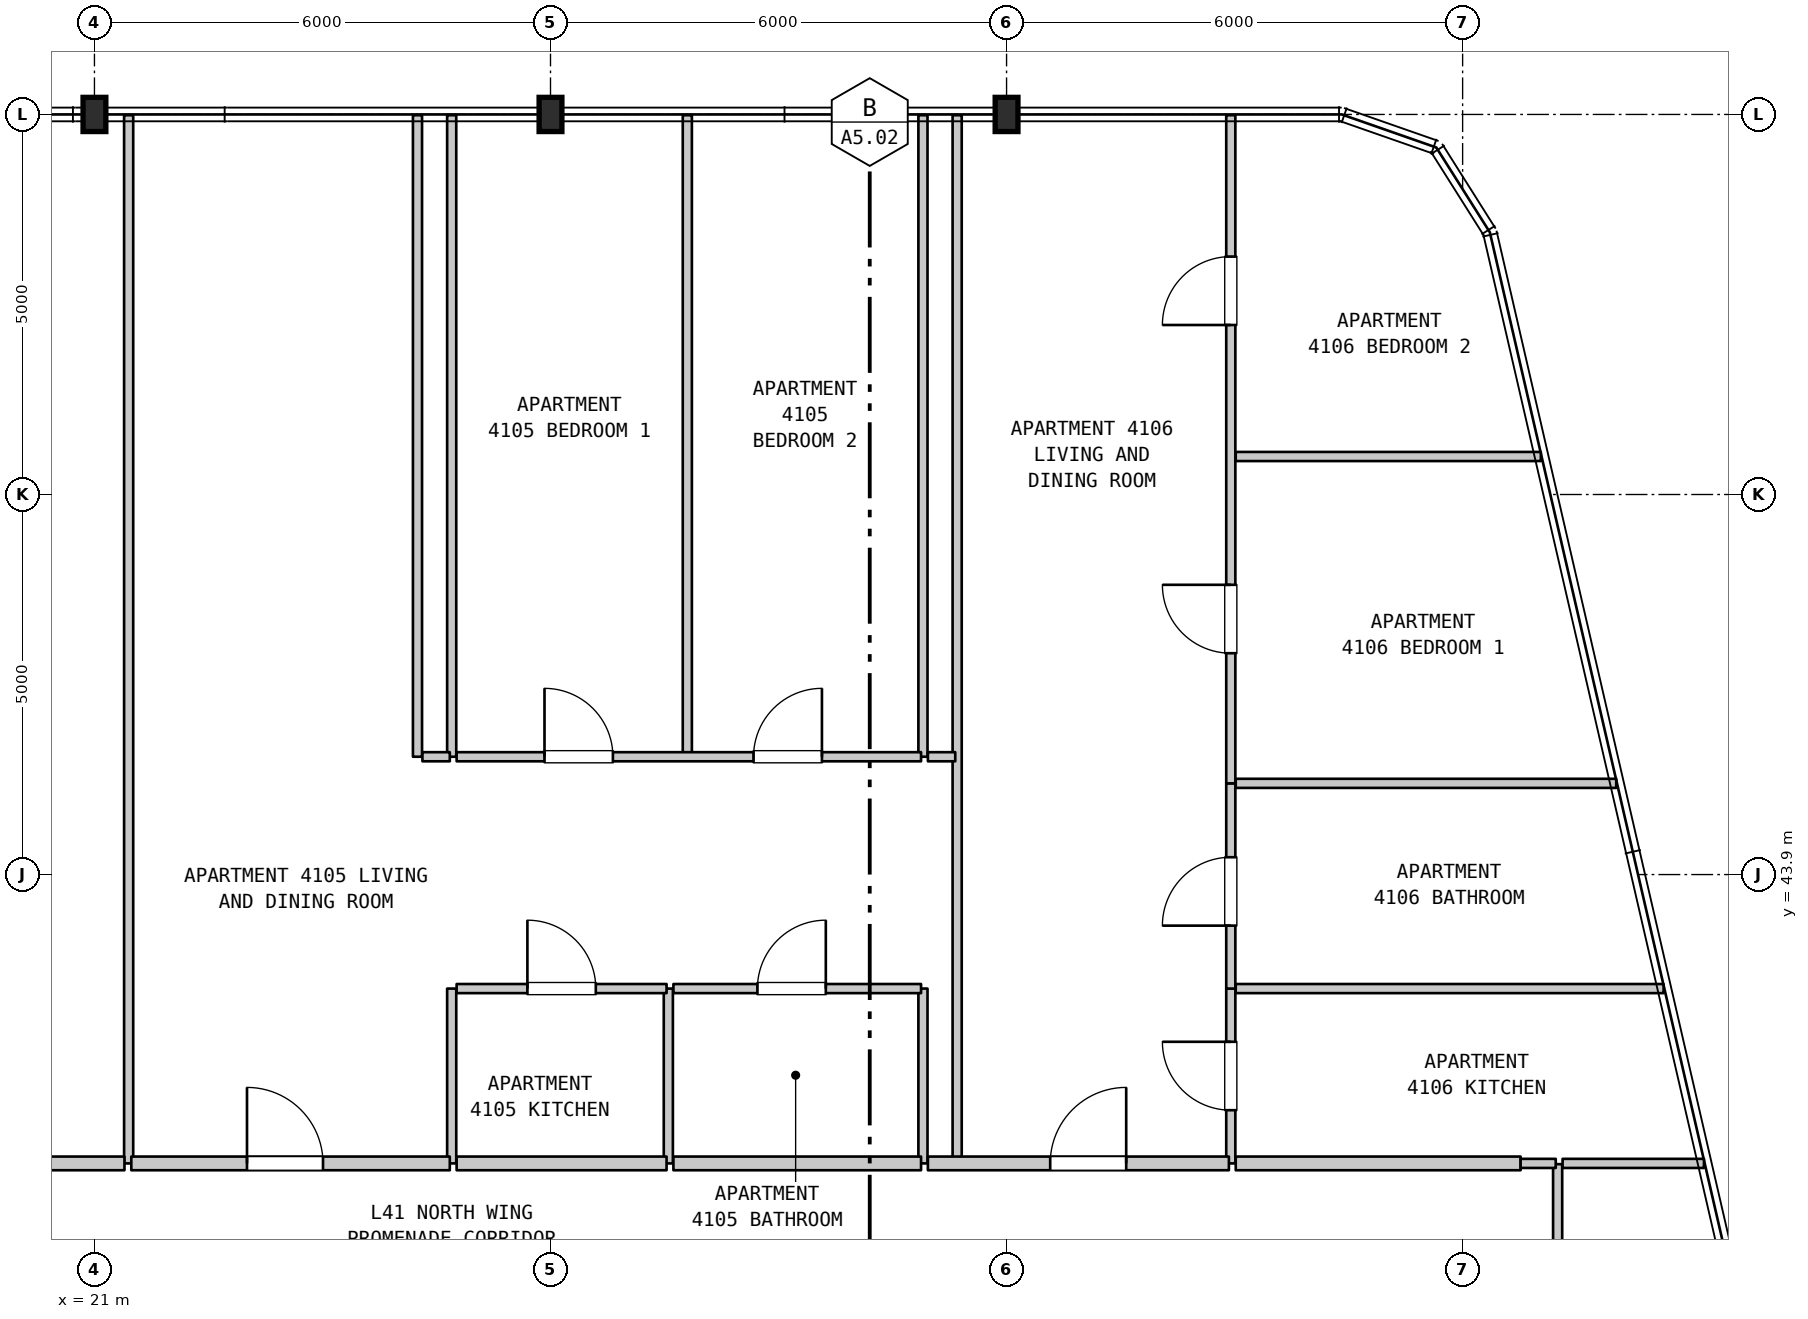
"""IFC4 building model, lengths in metres.
Left out: names, types, materials, properties, quantities, classifications, styles, units other than length and angle.
Written with IfcOpenShell. Run it as: python <this file> out.ifc"""

import sys

from ifc_helpers import new_model, si_unit, direction, frame, frame_2d, origin, origin_2d, place, context, subcontext, project, spatial, rectangle, i_section, extrude, element, fill, save


model = new_model("IFC4")
c1 = context("Model", 3, precision=1e-05, world=origin(), true_north=direction((0.0, 1.0)))
c2 = subcontext(c1, "Body", "Model", "MODEL_VIEW")
j1 = project(units=[si_unit("LENGTHUNIT", "METRE"), si_unit("PLANEANGLEUNIT", "RADIAN")], contexts=[c1])
p1 = place(None, origin())
s1 = spatial("IfcSite", under=j1, at=p1, CompositionType="ELEMENT")
p2 = place(p1, origin())
s2 = spatial("IfcBuilding", under=s1, at=p2, CompositionType="ELEMENT")
p3 = place(p2, frame((0.0, 0.0, 169.1)))
s3 = spatial("IfcBuildingStorey", under=s2, at=p3, CompositionType="ELEMENT", Elevation=169.1)
for number, where, z_axis, x_axis in (
    (1, (21.0, 53.9, 0.0), (0.0, 0.0, 1.0), (1.0, 0.0, 0.0)),
    (2, (27.0, 53.9, 0.0), (0.0, 0.0, 1.0), (1.0, 0.0, 0.0)),
    (3, (33.0, 53.9, 0.0), (0.0, 0.0, 1.0), (1.0, 0.0, 0.0)),
):
    element("IfcColumn", number, at=place(p3, frame(where, z_axis=z_axis, x_axis=x_axis)), inside=s3, PredefinedType="COLUMN", context=c2, shape_type="SweptSolid", body=[
        extrude(i_section(OverallWidth=0.3, OverallDepth=0.45, WebThickness=0.014, FlangeThickness=0.026, FilletRadius=0.027, at=origin_2d()), origin(), (0.0, 0.0, 1.0), 3.7),
    ])
p4 = place(p3, frame((21.45, 40.1, 0.0), z_axis=(0.0, 0.0, 1.0), x_axis=(0.0, 1.0, 0.0)))
e4 = element("IfcWall", 4, at=p4, inside=s3, PredefinedType="PARTITIONING", context=c2, shape_type="SweptSolid", body=[
    extrude(rectangle(XDim=13.79, YDim=0.12, at=frame_2d((6.895, 0.0))), origin(), (0.0, 0.0, 1.0), 3.39),
])
p5 = place(p3, frame((25.25, 45.45, 0.0), z_axis=(0.0, 0.0, 1.0), x_axis=(0.0, 1.0, 0.0)))
e5 = element("IfcWall", 5, at=p5, inside=s3, PredefinedType="PARTITIONING", context=c2, shape_type="SweptSolid", body=[
    extrude(rectangle(XDim=8.44, YDim=0.12, at=frame_2d((4.22, 0.0))), origin(), (0.0, 0.0, 1.0), 3.39),
])
p6 = place(p3, frame((25.7, 40.1, 0.0), z_axis=(0.0, 0.0, 1.0), x_axis=(0.0, 1.0, 0.0)))
e6 = element("IfcWall", 6, at=p6, inside=s3, PredefinedType="PARTITIONING", context=c2, shape_type="SweptSolid", body=[
    extrude(rectangle(XDim=2.3, YDim=0.12, at=frame_2d((1.15, 0.0))), origin(), (0.0, 0.0, 1.0), 3.39),
])
p7 = place(p3, frame((25.7, 45.45, 0.0), z_axis=(0.0, 0.0, 1.0), x_axis=(0.0, 1.0, 0.0)))
e7 = element("IfcWall", 7, at=p7, inside=s3, PredefinedType="PARTITIONING", context=c2, shape_type="SweptSolid", body=[
    extrude(rectangle(XDim=8.44, YDim=0.12, at=frame_2d((4.22, 0.0))), origin(), (0.0, 0.0, 1.0), 3.39),
])
p8 = place(p3, frame((28.55, 40.1, 0.0), z_axis=(0.0, 0.0, 1.0), x_axis=(0.0, 1.0, 0.0)))
e8 = element("IfcWall", 8, at=p8, inside=s3, PredefinedType="PARTITIONING", context=c2, shape_type="SweptSolid", body=[
    extrude(rectangle(XDim=2.3, YDim=0.12, at=frame_2d((1.15, 0.0))), origin(), (0.0, 0.0, 1.0), 3.39),
])
p9 = place(p3, frame((28.8, 45.45, 0.0), z_axis=(0.0, 0.0, 1.0), x_axis=(0.0, 1.0, 0.0)))
e9 = element("IfcWall", 9, at=p9, inside=s3, PredefinedType="PARTITIONING", context=c2, shape_type="SweptSolid", body=[
    extrude(rectangle(XDim=8.44, YDim=0.12, at=frame_2d((4.22, 0.0))), origin(), (0.0, 0.0, 1.0), 3.39),
])
p10 = place(p3, frame((31.9, 40.1, 0.0), z_axis=(0.0, 0.0, 1.0), x_axis=(0.0, 1.0, 0.0)))
e10 = element("IfcWall", 10, at=p10, inside=s3, PredefinedType="PARTITIONING", context=c2, shape_type="SweptSolid", body=[
    extrude(rectangle(XDim=2.3, YDim=0.12, at=frame_2d((1.15, 0.0))), origin(), (0.0, 0.0, 1.0), 3.39),
])
p11 = place(p3, frame((31.9, 45.45, 0.0), z_axis=(0.0, 0.0, 1.0), x_axis=(0.0, 1.0, 0.0)))
e11 = element("IfcWall", 11, at=p11, inside=s3, PredefinedType="PARTITIONING", context=c2, shape_type="SweptSolid", body=[
    extrude(rectangle(XDim=8.44, YDim=0.12, at=frame_2d((4.22, 0.0))), origin(), (0.0, 0.0, 1.0), 3.39),
])
p12 = place(p3, frame((32.35, 40.1, 0.0), z_axis=(0.0, 0.0, 1.0), x_axis=(0.0, 1.0, 0.0)))
e12 = element("IfcWall", 12, at=p12, inside=s3, PredefinedType="PARTITIONING", context=c2, shape_type="SweptSolid", body=[
    extrude(rectangle(XDim=13.79, YDim=0.12, at=frame_2d((6.895, 0.0))), origin(), (0.0, 0.0, 1.0), 3.39),
])
p13 = place(p3, frame((35.95, 40.1, 0.0), z_axis=(0.0, 0.0, 1.0), x_axis=(0.0, 1.0, 0.0)))
e13 = element("IfcWall", 13, at=p13, inside=s3, PredefinedType="PARTITIONING", context=c2, shape_type="SweptSolid", body=[
    extrude(rectangle(XDim=2.3, YDim=0.12, at=frame_2d((1.15, 0.0))), origin(), (0.0, 0.0, 1.0), 3.39),
])
p14 = place(p13, frame((0.7, 0.0, 0.0)))
e14 = element("IfcOpeningElement", 14, at=p14, cuts=e13, PredefinedType="OPENING", context=c2, shape_type="SweptSolid", body=[
    extrude(rectangle(XDim=0.9, YDim=2.15, at=frame_2d((0.45, 1.075))), frame((0.0, 0.07, 0.0), z_axis=(0.0, -1.0, 0.0), x_axis=(1.0, 0.0, 0.0)), (0.0, 0.0, 1.0), 0.14),
])
p15 = place(p3, frame((35.95, 42.4, 0.0), z_axis=(0.0, 0.0, 1.0), x_axis=(0.0, 1.0, 0.0)))
e15 = element("IfcWall", 15, at=p15, inside=s3, PredefinedType="PARTITIONING", context=c2, shape_type="SweptSolid", body=[
    extrude(rectangle(XDim=2.7, YDim=0.12, at=frame_2d((1.35, 0.0))), origin(), (0.0, 0.0, 1.0), 3.39),
])
p16 = place(p15, frame((0.828, 0.0, 0.0)))
e16 = element("IfcOpeningElement", 16, at=p16, cuts=e15, PredefinedType="OPENING", context=c2, shape_type="SweptSolid", body=[
    extrude(rectangle(XDim=0.9, YDim=2.1, at=frame_2d((0.45, 1.05))), frame((0.0, 0.07, 0.0), z_axis=(0.0, -1.0, 0.0), x_axis=(1.0, 0.0, 0.0)), (0.0, 0.0, 1.0), 0.14),
])
p17 = place(p3, frame((35.95, 45.1, 0.0), z_axis=(0.0, 0.0, 1.0), x_axis=(0.0, 1.0, 0.0)))
e17 = element("IfcWall", 17, at=p17, inside=s3, PredefinedType="PARTITIONING", context=c2, shape_type="SweptSolid", body=[
    extrude(rectangle(XDim=8.79, YDim=0.12, at=frame_2d((4.395, 0.0))), origin(), (0.0, 0.0, 1.0), 3.39),
])
p18 = place(p17, frame((1.712, 0.0, 0.0)))
e18 = element("IfcOpeningElement", 18, at=p18, cuts=e17, PredefinedType="OPENING", context=c2, shape_type="SweptSolid", body=[
    extrude(rectangle(XDim=0.9, YDim=2.15, at=frame_2d((0.45, 1.075))), frame((0.0, 0.07, 0.0), z_axis=(0.0, -1.0, 0.0), x_axis=(1.0, 0.0, 0.0)), (0.0, 0.0, 1.0), 0.14),
])
p19 = place(p17, frame((6.03, 0.0, 0.0)))
e19 = element("IfcOpeningElement", 19, at=p19, cuts=e17, PredefinedType="OPENING", context=c2, shape_type="SweptSolid", body=[
    extrude(rectangle(XDim=0.9, YDim=2.15, at=frame_2d((0.45, 1.075))), frame((0.0, 0.07, 0.0), z_axis=(0.0, -1.0, 0.0), x_axis=(1.0, 0.0, 0.0)), (0.0, 0.0, 1.0), 0.14),
])
p20 = place(p3, frame((40.25, 37.949, 0.0), z_axis=(0.0, 0.0, 1.0), x_axis=(0.0, 1.0, 0.0)))
e20 = element("IfcWall", 20, at=p20, inside=s3, PredefinedType="PARTITIONING", context=c2, shape_type="SweptSolid", body=[
    extrude(rectangle(XDim=2.141, YDim=0.12, at=frame_2d((1.071, 0.0))), origin(), (0.0, 0.0, 1.0), 3.39),
])
p21 = place(p3, frame((18.985, 40.1, 0.0), z_axis=(0.0, 0.0, 1.0), x_axis=(1.0, 0.0, 0.0)))
e21 = element("IfcWall", 21, at=p21, inside=s3, PredefinedType="STANDARD", context=c2, shape_type="SweptSolid", body=[
    extrude(rectangle(XDim=2.41, YDim=0.18, at=frame_2d((1.205, 0.0))), origin(), (0.0, 0.0, 1.0), 3.39),
])
p22 = place(p3, frame((21.485, 40.1, 0.0), z_axis=(0.0, 0.0, 1.0), x_axis=(1.0, 0.0, 0.0)))
e22 = element("IfcWall", 22, at=p22, inside=s3, PredefinedType="STANDARD", context=c2, shape_type="SweptSolid", body=[
    extrude(rectangle(XDim=4.19, YDim=0.18, at=frame_2d((2.095, 0.0))), origin(), (0.0, 0.0, 1.0), 3.39),
])
p23 = place(p22, frame((1.522, 0.0, 0.0)))
e23 = element("IfcOpeningElement", 23, at=p23, cuts=e22, PredefinedType="OPENING", context=c2, shape_type="SweptSolid", body=[
    extrude(rectangle(XDim=1.0, YDim=2.15, at=frame_2d((0.5, 1.075))), frame((0.0, 0.1, 0.0), z_axis=(0.0, -1.0, 0.0), x_axis=(1.0, 0.0, 0.0)), (0.0, 0.0, 1.0), 0.2),
])
p24 = place(p3, frame((25.765, 40.1, 0.0), z_axis=(0.0, 0.0, 1.0), x_axis=(1.0, 0.0, 0.0)))
e24 = element("IfcWall", 24, at=p24, inside=s3, PredefinedType="STANDARD", context=c2, shape_type="SweptSolid", body=[
    extrude(rectangle(XDim=2.762, YDim=0.18, at=frame_2d((1.381, 0.0))), origin(), (0.0, 0.0, 1.0), 3.39),
])
p25 = place(p3, frame((28.617, 40.1, 0.0), z_axis=(0.0, 0.0, 1.0), x_axis=(1.0, 0.0, 0.0)))
e25 = element("IfcWall", 25, at=p25, inside=s3, PredefinedType="STANDARD", context=c2, shape_type="SweptSolid", body=[
    extrude(rectangle(XDim=3.258, YDim=0.18, at=frame_2d((1.629, 0.0))), origin(), (0.0, 0.0, 1.0), 3.39),
])
p26 = place(p3, frame((31.965, 40.1, 0.0), z_axis=(0.0, 0.0, 1.0), x_axis=(1.0, 0.0, 0.0)))
e26 = element("IfcWall", 26, at=p26, inside=s3, PredefinedType="STANDARD", context=c2, shape_type="SweptSolid", body=[
    extrude(rectangle(XDim=3.96, YDim=0.18, at=frame_2d((1.98, 0.0))), origin(), (0.0, 0.0, 1.0), 3.39),
])
p27 = place(p26, frame((1.609, 0.0, 0.0)))
e27 = element("IfcOpeningElement", 27, at=p27, cuts=e26, PredefinedType="OPENING", context=c2, shape_type="SweptSolid", body=[
    extrude(rectangle(XDim=1.0, YDim=2.15, at=frame_2d((0.5, 1.075))), frame((0.0, 0.1, 0.0), z_axis=(0.0, -1.0, 0.0), x_axis=(1.0, 0.0, 0.0)), (0.0, 0.0, 1.0), 0.2),
])
p28 = place(p3, frame((36.015, 40.1, 0.0), z_axis=(0.0, 0.0, 1.0), x_axis=(1.0, 0.0, 0.0)))
e28 = element("IfcWall", 28, at=p28, inside=s3, PredefinedType="STANDARD", context=c2, shape_type="SweptSolid", body=[
    extrude(rectangle(XDim=3.748, YDim=0.18, at=frame_2d((1.874, 0.0))), origin(), (0.0, 0.0, 1.0), 3.39),
])
p29 = place(p3, frame((39.763, 40.1, 0.0), z_axis=(0.0, 0.0, 1.0), x_axis=(1.0, 0.0, 0.0)))
e29 = element("IfcWall", 29, at=p29, inside=s3, PredefinedType="PARTITIONING", context=c2, shape_type="SweptSolid", body=[
    extrude(rectangle(XDim=0.462, YDim=0.12, at=frame_2d((0.231, 0.0))), origin(), (0.0, 0.0, 1.0), 3.39),
])
p30 = place(p3, frame((40.315, 40.1, 0.0), z_axis=(0.0, 0.0, 1.0), x_axis=(1.0, 0.0, 0.0)))
e30 = element("IfcWall", 30, at=p30, inside=s3, PredefinedType="PARTITIONING", context=c2, shape_type="SweptSolid", body=[
    extrude(rectangle(XDim=1.86, YDim=0.12, at=frame_2d((0.93, 0.0))), origin(), (0.0, 0.0, 1.0), 3.39),
])
p31 = place(p3, frame((25.765, 42.4, 0.0), z_axis=(0.0, 0.0, 1.0), x_axis=(1.0, 0.0, 0.0)))
e31 = element("IfcWall", 31, at=p31, inside=s3, PredefinedType="PARTITIONING", context=c2, shape_type="SweptSolid", body=[
    extrude(rectangle(XDim=2.762, YDim=0.12, at=frame_2d((1.381, 0.0))), origin(), (0.0, 0.0, 1.0), 3.39),
])
p32 = place(p31, frame((0.931, 0.0, 0.0)))
e32 = element("IfcOpeningElement", 32, at=p32, cuts=e31, PredefinedType="OPENING", context=c2, shape_type="SweptSolid", body=[
    extrude(rectangle(XDim=0.9, YDim=2.15, at=frame_2d((0.45, 1.075))), frame((0.0, 0.07, 0.0), z_axis=(0.0, -1.0, 0.0), x_axis=(1.0, 0.0, 0.0)), (0.0, 0.0, 1.0), 0.14),
])
p33 = place(p3, frame((28.617, 42.4, 0.0), z_axis=(0.0, 0.0, 1.0), x_axis=(1.0, 0.0, 0.0)))
e33 = element("IfcWall", 33, at=p33, inside=s3, PredefinedType="PARTITIONING", context=c2, shape_type="SweptSolid", body=[
    extrude(rectangle(XDim=3.258, YDim=0.12, at=frame_2d((1.629, 0.0))), origin(), (0.0, 0.0, 1.0), 3.39),
])
p34 = place(p33, frame((1.105, 0.0, 0.0)))
e34 = element("IfcOpeningElement", 34, at=p34, cuts=e33, PredefinedType="OPENING", context=c2, shape_type="SweptSolid", body=[
    extrude(rectangle(XDim=0.9, YDim=2.1, at=frame_2d((0.45, 1.05))), frame((0.0, 0.07, 0.0), z_axis=(0.0, -1.0, 0.0), x_axis=(1.0, 0.0, 0.0)), (0.0, 0.0, 1.0), 0.14),
])
p35 = place(p3, frame((36.015, 42.4, 0.0), z_axis=(0.0, 0.0, 1.0), x_axis=(1.0, 0.0, 0.0)))
e35 = element("IfcWall", 35, at=p35, inside=s3, PredefinedType="PARTITIONING", context=c2, shape_type="SweptSolid", body=[
    extrude(rectangle(XDim=5.629, YDim=0.12, at=frame_2d((2.814, 0.0))), origin(), (0.0, 0.0, 1.0), 3.39),
])
p36 = place(p3, frame((36.015, 45.1, 0.0), z_axis=(0.0, 0.0, 1.0), x_axis=(1.0, 0.0, 0.0)))
e36 = element("IfcWall", 36, at=p36, inside=s3, PredefinedType="PARTITIONING", context=c2, shape_type="SweptSolid", body=[
    extrude(rectangle(XDim=5.006, YDim=0.12, at=frame_2d((2.503, 0.0))), origin(), (0.0, 0.0, 1.0), 3.39),
])
p37 = place(p3, frame((25.315, 45.45, 0.0), z_axis=(0.0, 0.0, 1.0), x_axis=(1.0, 0.0, 0.0)))
e37 = element("IfcWall", 37, at=p37, inside=s3, PredefinedType="PARTITIONING", context=c2, shape_type="SweptSolid", body=[
    extrude(rectangle(XDim=0.36, YDim=0.12, at=frame_2d((0.18, 0.0))), origin(), (0.0, 0.0, 1.0), 3.39),
])
p38 = place(p3, frame((25.765, 45.45, 0.0), z_axis=(0.0, 0.0, 1.0), x_axis=(1.0, 0.0, 0.0)))
e38 = element("IfcWall", 38, at=p38, inside=s3, PredefinedType="PARTITIONING", context=c2, shape_type="SweptSolid", body=[
    extrude(rectangle(XDim=6.11, YDim=0.12, at=frame_2d((3.055, 0.0))), origin(), (0.0, 0.0, 1.0), 3.39),
])
p39 = place(p38, frame((1.156, 0.0, 0.0)))
e39 = element("IfcOpeningElement", 39, at=p39, cuts=e38, PredefinedType="OPENING", context=c2, shape_type="SweptSolid", body=[
    extrude(rectangle(XDim=0.9, YDim=2.15, at=frame_2d((0.45, 1.075))), frame((0.0, 0.07, 0.0), z_axis=(0.0, -1.0, 0.0), x_axis=(1.0, 0.0, 0.0)), (0.0, 0.0, 1.0), 0.14),
])
p40 = place(p38, frame((3.906, 0.0, 0.0)))
e40 = element("IfcOpeningElement", 40, at=p40, cuts=e38, PredefinedType="OPENING", context=c2, shape_type="SweptSolid", body=[
    extrude(rectangle(XDim=0.9, YDim=2.15, at=frame_2d((0.45, 1.075))), frame((0.0, 0.07, 0.0), z_axis=(0.0, -1.0, 0.0), x_axis=(1.0, 0.0, 0.0)), (0.0, 0.0, 1.0), 0.14),
])
p41 = place(p3, frame((31.965, 45.45, 0.0), z_axis=(0.0, 0.0, 1.0), x_axis=(1.0, 0.0, 0.0)))
e41 = element("IfcWall", 41, at=p41, inside=s3, PredefinedType="PARTITIONING", context=c2, shape_type="SweptSolid", body=[
    extrude(rectangle(XDim=0.36, YDim=0.12, at=frame_2d((0.18, 0.0))), origin(), (0.0, 0.0, 1.0), 3.39),
])
p42 = place(p3, frame((36.015, 49.4, 0.0), z_axis=(0.0, 0.0, 1.0), x_axis=(1.0, 0.0, 0.0)))
e42 = element("IfcWall", 42, at=p42, inside=s3, PredefinedType="PARTITIONING", context=c2, shape_type="SweptSolid", body=[
    extrude(rectangle(XDim=4.014, YDim=0.12, at=frame_2d((2.007, 0.0))), origin(), (0.0, 0.0, 1.0), 3.39),
])
p43 = place(p14, origin())
e43 = element("IfcDoor", 43, at=p43, inside=s3, OperationType="SINGLE_SWING_RIGHT", PredefinedType="DOOR", context=c2, shape_type="SweptSolid", body=[
    extrude(rectangle(XDim=0.9, YDim=2.15, at=frame_2d((0.45, 1.075))), frame((0.0, 0.025, 0.0), z_axis=(0.0, -1.0, 0.0), x_axis=(1.0, 0.0, 0.0)), (0.0, 0.0, 1.0), 0.05),
])
fill(e14, e43)
p44 = place(p16, origin())
e44 = element("IfcDoor", 44, at=p44, inside=s3, OperationType="SINGLE_SWING_LEFT", PredefinedType="DOOR", context=c2, shape_type="SweptSolid", body=[
    extrude(rectangle(XDim=0.9, YDim=2.1, at=frame_2d((0.45, 1.05))), frame((0.0, 0.025, 0.0), z_axis=(0.0, -1.0, 0.0), x_axis=(1.0, 0.0, 0.0)), (0.0, 0.0, 1.0), 0.05),
])
fill(e16, e44)
p45 = place(p18, origin())
e45 = element("IfcDoor", 45, at=p45, inside=s3, OperationType="SINGLE_SWING_RIGHT", PredefinedType="DOOR", context=c2, shape_type="SweptSolid", body=[
    extrude(rectangle(XDim=0.9, YDim=2.15, at=frame_2d((0.45, 1.075))), frame((0.0, 0.025, 0.0), z_axis=(0.0, -1.0, 0.0), x_axis=(1.0, 0.0, 0.0)), (0.0, 0.0, 1.0), 0.05),
])
fill(e18, e45)
p46 = place(p19, origin())
e46 = element("IfcDoor", 46, at=p46, inside=s3, OperationType="SINGLE_SWING_LEFT", PredefinedType="DOOR", context=c2, shape_type="SweptSolid", body=[
    extrude(rectangle(XDim=0.9, YDim=2.15, at=frame_2d((0.45, 1.075))), frame((0.0, 0.025, 0.0), z_axis=(0.0, -1.0, 0.0), x_axis=(1.0, 0.0, 0.0)), (0.0, 0.0, 1.0), 0.05),
])
fill(e19, e46)
p47 = place(p23, origin())
e47 = element("IfcDoor", 47, at=p47, inside=s3, OperationType="SINGLE_SWING_LEFT", PredefinedType="DOOR", context=c2, shape_type="SweptSolid", body=[
    extrude(rectangle(XDim=1.0, YDim=2.15, at=frame_2d((0.5, 1.075))), frame((0.0, 0.025, 0.0), z_axis=(0.0, -1.0, 0.0), x_axis=(1.0, 0.0, 0.0)), (0.0, 0.0, 1.0), 0.05),
])
fill(e23, e47)
p48 = place(p27, origin())
e48 = element("IfcDoor", 48, at=p48, inside=s3, OperationType="SINGLE_SWING_RIGHT", PredefinedType="DOOR", context=c2, shape_type="SweptSolid", body=[
    extrude(rectangle(XDim=1.0, YDim=2.15, at=frame_2d((0.5, 1.075))), frame((0.0, 0.025, 0.0), z_axis=(0.0, -1.0, 0.0), x_axis=(1.0, 0.0, 0.0)), (0.0, 0.0, 1.0), 0.05),
])
fill(e27, e48)
p49 = place(p32, origin())
e49 = element("IfcDoor", 49, at=p49, inside=s3, OperationType="SINGLE_SWING_LEFT", PredefinedType="DOOR", context=c2, shape_type="SweptSolid", body=[
    extrude(rectangle(XDim=0.9, YDim=2.15, at=frame_2d((0.45, 1.075))), frame((0.0, 0.025, 0.0), z_axis=(0.0, -1.0, 0.0), x_axis=(1.0, 0.0, 0.0)), (0.0, 0.0, 1.0), 0.05),
])
fill(e32, e49)
p50 = place(p34, origin())
e50 = element("IfcDoor", 50, at=p50, inside=s3, OperationType="SINGLE_SWING_RIGHT", PredefinedType="DOOR", context=c2, shape_type="SweptSolid", body=[
    extrude(rectangle(XDim=0.9, YDim=2.1, at=frame_2d((0.45, 1.05))), frame((0.0, 0.025, 0.0), z_axis=(0.0, -1.0, 0.0), x_axis=(1.0, 0.0, 0.0)), (0.0, 0.0, 1.0), 0.05),
])
fill(e34, e50)
p51 = place(p39, origin())
e51 = element("IfcDoor", 51, at=p51, inside=s3, OperationType="SINGLE_SWING_LEFT", PredefinedType="DOOR", context=c2, shape_type="SweptSolid", body=[
    extrude(rectangle(XDim=0.9, YDim=2.15, at=frame_2d((0.45, 1.075))), frame((0.0, 0.025, 0.0), z_axis=(0.0, -1.0, 0.0), x_axis=(1.0, 0.0, 0.0)), (0.0, 0.0, 1.0), 0.05),
])
fill(e39, e51)
p52 = place(p40, origin())
e52 = element("IfcDoor", 52, at=p52, inside=s3, OperationType="SINGLE_SWING_RIGHT", PredefinedType="DOOR", context=c2, shape_type="SweptSolid", body=[
    extrude(rectangle(XDim=0.9, YDim=2.15, at=frame_2d((0.45, 1.075))), frame((0.0, 0.025, 0.0), z_axis=(0.0, -1.0, 0.0), x_axis=(1.0, 0.0, 0.0)), (0.0, 0.0, 1.0), 0.05),
])
fill(e40, e52)
save(model, sys.argv[1])
